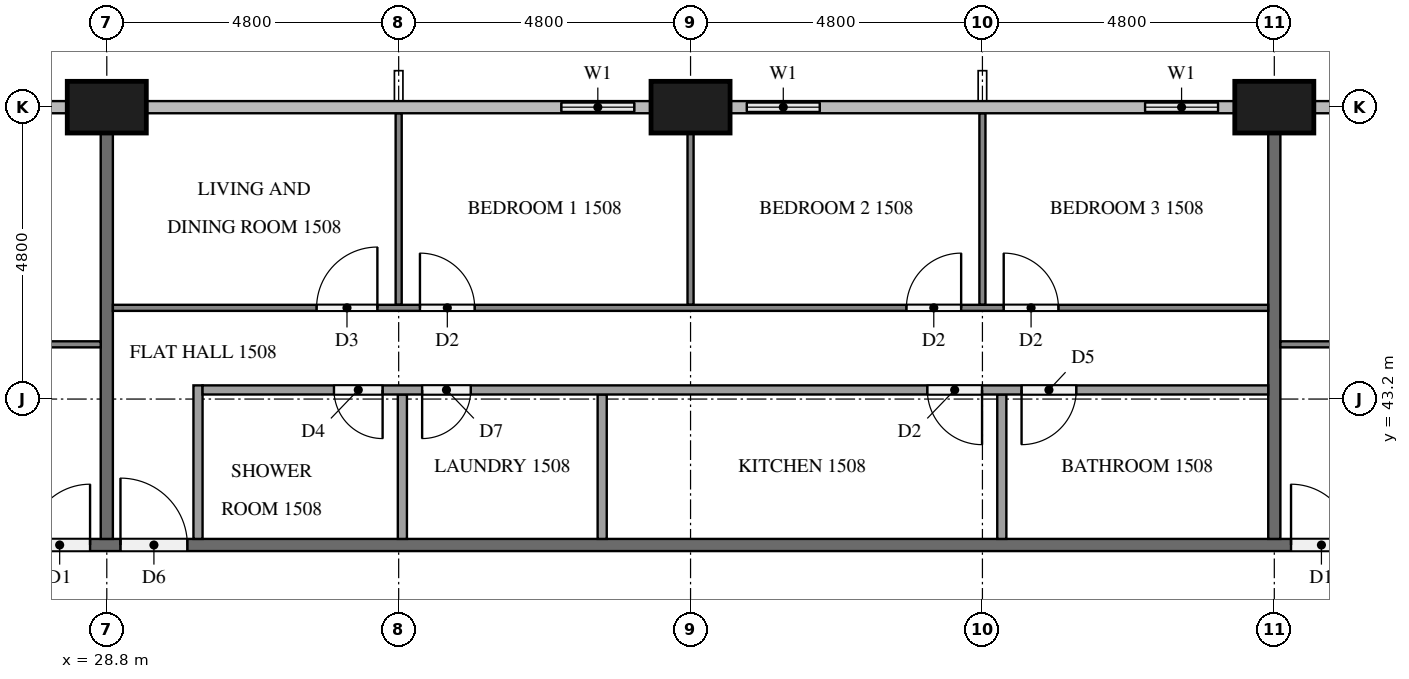
"""IFC4 building model, lengths in metres.
Left out: names, types, materials, properties, quantities, classifications, styles, units other than length and angle.
Written with IfcOpenShell. Run it as: python <this file> out.ifc"""

import sys

from ifc_helpers import new_model, si_unit, direction, frame, frame_2d, origin, origin_2d, place, context, subcontext, project, spatial, rectangle, extrude, element, fill, save


model = new_model("IFC4")
c1 = context("Model", 3, precision=1e-05, world=origin(), true_north=direction((0.0, 1.0)))
c2 = subcontext(c1, "Body", "Model", "MODEL_VIEW")
j1 = project(units=[si_unit("LENGTHUNIT", "METRE"), si_unit("PLANEANGLEUNIT", "RADIAN")], contexts=[c1])
p1 = place(None, origin())
s1 = spatial("IfcSite", under=j1, at=p1, CompositionType="ELEMENT")
p2 = place(p1, origin())
s2 = spatial("IfcBuilding", under=s1, at=p2, CompositionType="ELEMENT")
p3 = place(p2, frame((0.0, 0.0, 62.8)))
s3 = spatial("IfcBuildingStorey", under=s2, at=p3, CompositionType="ELEMENT", Elevation=62.8)
for number, where, z_axis, x_axis in (
    (1, (48.0, 48.0, 0.0), (0.0, 0.0, 1.0), (1.0, 0.0, 0.0)),
    (2, (38.4, 48.0, 0.0), (0.0, 0.0, 1.0), (1.0, 0.0, 0.0)),
    (3, (28.8, 48.0, 0.0), (0.0, 0.0, 1.0), (1.0, 0.0, 0.0)),
):
    element("IfcColumn", number, at=place(p3, frame(where, z_axis=z_axis, x_axis=x_axis)), inside=s3, PredefinedType="COLUMN", context=c2, shape_type="SweptSolid", body=[
        extrude(rectangle(XDim=1.3, YDim=0.85, at=origin_2d()), origin(), (0.0, 0.0, 1.0), 3.2),
    ])
p4 = place(p3, frame((50.4, 48.0, 0.0), z_axis=(0.0, 0.0, 1.0), x_axis=(-1.0, 0.0, 0.0)))
e4 = element("IfcWall", 4, at=p4, inside=s3, PredefinedType="SOLIDWALL", context=c2, shape_type="SweptSolid", body=[
    extrude(rectangle(XDim=1.75, YDim=0.15, at=frame_2d((0.875, 0.0))), origin(), (0.0, 0.0, 1.0), 3.2),
])
p5 = place(p4, frame((0.275, 0.0, 0.9)))
e5 = element("IfcOpeningElement", 5, at=p5, cuts=e4, PredefinedType="OPENING", context=c2, shape_type="SweptSolid", body=[
    extrude(rectangle(XDim=1.2, YDim=1.4, at=frame_2d((0.6, 0.7))), frame((0.0, 0.085, 0.0), z_axis=(0.0, -1.0, 0.0), x_axis=(1.0, 0.0, 0.0)), (0.0, 0.0, 1.0), 0.17),
])
p6 = place(p3, frame((47.35, 48.0, 0.0), z_axis=(0.0, 0.0, 1.0), x_axis=(-1.0, 0.0, 0.0)))
e6 = element("IfcWall", 6, at=p6, inside=s3, PredefinedType="SOLIDWALL", context=c2, shape_type="SweptSolid", body=[
    extrude(rectangle(XDim=1.75, YDim=0.15, at=frame_2d((0.875, 0.0))), origin(), (0.0, 0.0, 1.0), 3.2),
])
p7 = place(p6, frame((0.275, 0.0, 0.9)))
e7 = element("IfcOpeningElement", 7, at=p7, cuts=e6, PredefinedType="OPENING", context=c2, shape_type="SweptSolid", body=[
    extrude(rectangle(XDim=1.2, YDim=1.4, at=frame_2d((0.6, 0.7))), frame((0.0, 0.085, 0.0), z_axis=(0.0, -1.0, 0.0), x_axis=(1.0, 0.0, 0.0)), (0.0, 0.0, 1.0), 0.17),
])
p8 = place(p3, frame((40.8, 48.0, 0.0), z_axis=(0.0, 0.0, 1.0), x_axis=(-1.0, 0.0, 0.0)))
e8 = element("IfcWall", 8, at=p8, inside=s3, PredefinedType="SOLIDWALL", context=c2, shape_type="SweptSolid", body=[
    extrude(rectangle(XDim=1.75, YDim=0.15, at=frame_2d((0.875, 0.0))), origin(), (0.0, 0.0, 1.0), 3.2),
])
p9 = place(p8, frame((0.275, 0.0, 0.9)))
e9 = element("IfcOpeningElement", 9, at=p9, cuts=e8, PredefinedType="OPENING", context=c2, shape_type="SweptSolid", body=[
    extrude(rectangle(XDim=1.2, YDim=1.4, at=frame_2d((0.6, 0.7))), frame((0.0, 0.085, 0.0), z_axis=(0.0, -1.0, 0.0), x_axis=(1.0, 0.0, 0.0)), (0.0, 0.0, 1.0), 0.17),
])
p10 = place(p3, frame((37.75, 48.0, 0.0), z_axis=(0.0, 0.0, 1.0), x_axis=(-1.0, 0.0, 0.0)))
e10 = element("IfcWall", 10, at=p10, inside=s3, PredefinedType="SOLIDWALL", context=c2, shape_type="SweptSolid", body=[
    extrude(rectangle(XDim=1.75, YDim=0.15, at=frame_2d((0.875, 0.0))), origin(), (0.0, 0.0, 1.0), 3.2),
])
p11 = place(p10, frame((0.275, 0.0, 0.9)))
e11 = element("IfcOpeningElement", 11, at=p11, cuts=e10, PredefinedType="OPENING", context=c2, shape_type="SweptSolid", body=[
    extrude(rectangle(XDim=1.2, YDim=1.4, at=frame_2d((0.6, 0.7))), frame((0.0, 0.085, 0.0), z_axis=(0.0, -1.0, 0.0), x_axis=(1.0, 0.0, 0.0)), (0.0, 0.0, 1.0), 0.17),
])
p12 = place(p3, frame((28.15, 48.0, 0.0), z_axis=(0.0, 0.0, 1.0), x_axis=(-1.0, 0.0, 0.0)))
e12 = element("IfcWall", 12, at=p12, inside=s3, PredefinedType="SOLIDWALL", context=c2, shape_type="SweptSolid", body=[
    extrude(rectangle(XDim=1.75, YDim=0.15, at=frame_2d((0.875, 0.0))), origin(), (0.0, 0.0, 1.0), 3.2),
])
p13 = place(p12, frame((0.275, 0.0, 0.9)))
e13 = element("IfcOpeningElement", 13, at=p13, cuts=e12, PredefinedType="OPENING", context=c2, shape_type="SweptSolid", body=[
    extrude(rectangle(XDim=1.2, YDim=1.4, at=frame_2d((0.6, 0.7))), frame((0.0, 0.085, 0.0), z_axis=(0.0, -1.0, 0.0), x_axis=(1.0, 0.0, 0.0)), (0.0, 0.0, 1.0), 0.17),
])
p14 = place(p3, frame((11.9, 40.8, 0.0), z_axis=(0.0, 0.0, 1.0), x_axis=(1.0, 0.0, 0.0)))
e14 = element("IfcWall", 14, at=p14, inside=s3, PredefinedType="PARTITIONING", context=c2, shape_type="SweptSolid", body=[
    extrude(rectangle(XDim=38.6, YDim=0.2, at=frame_2d((19.3, 0.0))), origin(), (0.0, 0.0, 1.0), 3.2),
])
p15 = place(p14, frame((36.375, 0.0, 0.0)))
e15 = element("IfcOpeningElement", 15, at=p15, cuts=e14, PredefinedType="OPENING", context=c2, shape_type="SweptSolid", body=[
    extrude(rectangle(XDim=1.0, YDim=2.1, at=frame_2d((0.5, 1.05))), frame((0.0, 0.11, 0.0), z_axis=(0.0, -1.0, 0.0), x_axis=(1.0, 0.0, 0.0)), (0.0, 0.0, 1.0), 0.22),
])
p16 = place(p14, frame((17.125, 0.0, 0.0)))
e16 = element("IfcOpeningElement", 16, at=p16, cuts=e14, PredefinedType="OPENING", context=c2, shape_type="SweptSolid", body=[
    extrude(rectangle(XDim=1.1, YDim=2.1, at=frame_2d((0.55, 1.05))), frame((0.0, 0.11, 0.0), z_axis=(0.0, -1.0, 0.0), x_axis=(1.0, 0.0, 0.0)), (0.0, 0.0, 1.0), 0.22),
])
p17 = place(p14, frame((15.625, 0.0, 0.0)))
e17 = element("IfcOpeningElement", 17, at=p17, cuts=e14, PredefinedType="OPENING", context=c2, shape_type="SweptSolid", body=[
    extrude(rectangle(XDim=1.0, YDim=2.1, at=frame_2d((0.5, 1.05))), frame((0.0, 0.11, 0.0), z_axis=(0.0, -1.0, 0.0), x_axis=(1.0, 0.0, 0.0)), (0.0, 0.0, 1.0), 0.22),
])
p18 = place(p14, frame((1.225, 0.0, 0.0)))
e18 = element("IfcOpeningElement", 18, at=p18, cuts=e14, PredefinedType="OPENING", context=c2, shape_type="SweptSolid", body=[
    extrude(rectangle(XDim=1.0, YDim=2.1, at=frame_2d((0.5, 1.05))), frame((0.0, 0.11, 0.0), z_axis=(0.0, -1.0, 0.0), x_axis=(1.0, 0.0, 0.0)), (0.0, 0.0, 1.0), 0.22),
])
for number, where, z_axis, x_axis in (
    (19, (48.0, 47.575, 0.0), (0.0, 0.0, 1.0), (0.0, -1.0, 0.0)),
    (20, (28.8, 47.575, 0.0), (0.0, 0.0, 1.0), (0.0, -1.0, 0.0)),
):
    element("IfcWall", number, at=place(p3, frame(where, z_axis=z_axis, x_axis=x_axis)), inside=s3, PredefinedType="PARTITIONING", context=c2, shape_type="SweptSolid", body=[
        extrude(rectangle(XDim=6.675, YDim=0.2, at=frame_2d((3.337, 0.0))), origin(), (0.0, 0.0, 1.0), 3.2),
    ])
p19 = place(p3, frame((48.1, 44.1, 0.0), z_axis=(0.0, 0.0, 1.0), x_axis=(1.0, 0.0, 0.0)))
e21 = element("IfcWall", 21, at=p19, inside=s3, PredefinedType="PARTITIONING", context=c2, shape_type="SweptSolid", body=[
    extrude(rectangle(XDim=13.959, YDim=0.1, at=frame_2d((6.979, 0.0))), origin(), (0.0, 0.0, 1.0), 3.2),
])
p20 = place(p19, frame((3.45, 0.0, 0.0)))
e22 = element("IfcOpeningElement", 22, at=p20, cuts=e21, PredefinedType="OPENING", context=c2, shape_type="SweptSolid", body=[
    extrude(rectangle(XDim=0.9, YDim=2.1, at=frame_2d((0.45, 1.05))), frame((0.0, 0.06, 0.0), z_axis=(0.0, -1.0, 0.0), x_axis=(1.0, 0.0, 0.0)), (0.0, 0.0, 1.0), 0.12),
])
p21 = place(p19, frame((5.05, 0.0, 0.0)))
e23 = element("IfcOpeningElement", 23, at=p21, cuts=e21, PredefinedType="OPENING", context=c2, shape_type="SweptSolid", body=[
    extrude(rectangle(XDim=1.0, YDim=2.1, at=frame_2d((0.5, 1.05))), frame((0.0, 0.06, 0.0), z_axis=(0.0, -1.0, 0.0), x_axis=(1.0, 0.0, 0.0)), (0.0, 0.0, 1.0), 0.12),
])
p22 = place(p19, frame((12.759, 0.0, 0.0)))
e24 = element("IfcOpeningElement", 24, at=p22, cuts=e21, PredefinedType="OPENING", context=c2, shape_type="SweptSolid", body=[
    extrude(rectangle(XDim=0.9, YDim=2.1, at=frame_2d((0.45, 1.05))), frame((0.0, 0.06, 0.0), z_axis=(0.0, -1.0, 0.0), x_axis=(1.0, 0.0, 0.0)), (0.0, 0.0, 1.0), 0.12),
])
p23 = place(p3, frame((33.6, 44.75, 0.0), z_axis=(0.0, 0.0, 1.0), x_axis=(0.0, 1.0, 0.0)))
e25 = element("IfcWall", 25, at=p23, inside=s3, PredefinedType="PARTITIONING", context=c2, shape_type="SweptSolid", body=[
    extrude(rectangle(XDim=3.15, YDim=0.1, at=frame_2d((1.575, 0.0))), origin(), (0.0, 0.0, 1.0), 3.2),
])
p24 = place(p3, frame((38.4, 44.75, 0.0), z_axis=(0.0, 0.0, 1.0), x_axis=(0.0, 1.0, 0.0)))
e26 = element("IfcWall", 26, at=p24, inside=s3, PredefinedType="PARTITIONING", context=c2, shape_type="SweptSolid", body=[
    extrude(rectangle(XDim=2.825, YDim=0.1, at=frame_2d((1.413, 0.0))), origin(), (0.0, 0.0, 1.0), 3.2),
])
p25 = place(p3, frame((43.2, 44.75, 0.0), z_axis=(0.0, 0.0, 1.0), x_axis=(0.0, 1.0, 0.0)))
e27 = element("IfcWall", 27, at=p25, inside=s3, PredefinedType="PARTITIONING", context=c2, shape_type="SweptSolid", body=[
    extrude(rectangle(XDim=3.15, YDim=0.1, at=frame_2d((1.575, 0.0))), origin(), (0.0, 0.0, 1.0), 3.2),
])
p26 = place(p3, frame((28.9, 44.7, 0.0), z_axis=(0.0, 0.0, 1.0), x_axis=(1.0, 0.0, 0.0)))
e28 = element("IfcWall", 28, at=p26, inside=s3, PredefinedType="PARTITIONING", context=c2, shape_type="SweptSolid", body=[
    extrude(rectangle(XDim=19.0, YDim=0.1, at=frame_2d((9.5, 0.0))), origin(), (0.0, 0.0, 1.0), 3.2),
])
p27 = place(p26, frame((3.35, 0.0, 0.0)))
e29 = element("IfcOpeningElement", 29, at=p27, cuts=e28, PredefinedType="OPENING", context=c2, shape_type="SweptSolid", body=[
    extrude(rectangle(XDim=1.0, YDim=2.1, at=frame_2d((0.5, 1.05))), frame((0.0, 0.06, 0.0), z_axis=(0.0, -1.0, 0.0), x_axis=(1.0, 0.0, 0.0)), (0.0, 0.0, 1.0), 0.12),
])
p28 = place(p26, frame((5.05, 0.0, 0.0)))
e30 = element("IfcOpeningElement", 30, at=p28, cuts=e28, PredefinedType="OPENING", context=c2, shape_type="SweptSolid", body=[
    extrude(rectangle(XDim=0.9, YDim=2.1, at=frame_2d((0.45, 1.05))), frame((0.0, 0.06, 0.0), z_axis=(0.0, -1.0, 0.0), x_axis=(1.0, 0.0, 0.0)), (0.0, 0.0, 1.0), 0.12),
])
p29 = place(p26, frame((13.05, 0.0, 0.0)))
e31 = element("IfcOpeningElement", 31, at=p29, cuts=e28, PredefinedType="OPENING", context=c2, shape_type="SweptSolid", body=[
    extrude(rectangle(XDim=0.9, YDim=2.1, at=frame_2d((0.45, 1.05))), frame((0.0, 0.06, 0.0), z_axis=(0.0, -1.0, 0.0), x_axis=(1.0, 0.0, 0.0)), (0.0, 0.0, 1.0), 0.12),
])
p30 = place(p26, frame((14.65, 0.0, 0.0)))
e32 = element("IfcOpeningElement", 32, at=p30, cuts=e28, PredefinedType="OPENING", context=c2, shape_type="SweptSolid", body=[
    extrude(rectangle(XDim=0.9, YDim=2.1, at=frame_2d((0.45, 1.05))), frame((0.0, 0.06, 0.0), z_axis=(0.0, -1.0, 0.0), x_axis=(1.0, 0.0, 0.0)), (0.0, 0.0, 1.0), 0.12),
])
for number, where, z_axis, x_axis in (
    (33, (33.661, 40.9, 0.0), (0.0, 0.0, 1.0), (0.0, 1.0, 0.0)),
    (34, (36.947, 40.9, 0.0), (0.0, 0.0, 1.0), (0.0, 1.0, 0.0)),
    (35, (43.519, 40.9, 0.0), (0.0, 0.0, 1.0), (0.0, 1.0, 0.0)),
):
    element("IfcWall", number, at=place(p3, frame(where, z_axis=z_axis, x_axis=x_axis)), inside=s3, PredefinedType="PARTITIONING", context=c2, shape_type="SweptSolid", body=[
        extrude(rectangle(XDim=2.375, YDim=0.15, at=frame_2d((1.188, 0.0))), origin(), (0.0, 0.0, 1.0), 3.2),
    ])
p31 = place(p3, frame((30.3, 40.9, 0.0), z_axis=(0.0, 0.0, 1.0), x_axis=(0.0, 1.0, 0.0)))
e36 = element("IfcWall", 36, at=p31, inside=s3, PredefinedType="PARTITIONING", context=c2, shape_type="SweptSolid", body=[
    extrude(rectangle(XDim=2.525, YDim=0.15, at=frame_2d((1.263, 0.0))), origin(), (0.0, 0.0, 1.0), 3.2),
])
p32 = place(p3, frame((47.9, 43.35, 0.0), z_axis=(0.0, 0.0, 1.0), x_axis=(-1.0, 0.0, 0.0)))
e37 = element("IfcWall", 37, at=p32, inside=s3, PredefinedType="PARTITIONING", context=c2, shape_type="SweptSolid", body=[
    extrude(rectangle(XDim=17.525, YDim=0.15, at=frame_2d((8.762, 0.0))), origin(), (0.0, 0.0, 1.0), 3.2),
])
p33 = place(p32, frame((14.564, 0.0, 0.0)))
e38 = element("IfcOpeningElement", 38, at=p33, cuts=e37, PredefinedType="OPENING", context=c2, shape_type="SweptSolid", body=[
    extrude(rectangle(XDim=0.8, YDim=2.1, at=frame_2d((0.4, 1.05))), frame((0.0, 0.085, 0.0), z_axis=(0.0, -1.0, 0.0), x_axis=(1.0, 0.0, 0.0)), (0.0, 0.0, 1.0), 0.17),
])
p34 = place(p32, frame((13.114, 0.0, 0.0)))
e39 = element("IfcOpeningElement", 39, at=p34, cuts=e37, PredefinedType="OPENING", context=c2, shape_type="SweptSolid", body=[
    extrude(rectangle(XDim=0.8, YDim=2.1, at=frame_2d((0.4, 1.05))), frame((0.0, 0.085, 0.0), z_axis=(0.0, -1.0, 0.0), x_axis=(1.0, 0.0, 0.0)), (0.0, 0.0, 1.0), 0.17),
])
p35 = place(p32, frame((4.706, 0.0, 0.0)))
e40 = element("IfcOpeningElement", 40, at=p35, cuts=e37, PredefinedType="OPENING", context=c2, shape_type="SweptSolid", body=[
    extrude(rectangle(XDim=0.9, YDim=2.1, at=frame_2d((0.45, 1.05))), frame((0.0, 0.085, 0.0), z_axis=(0.0, -1.0, 0.0), x_axis=(1.0, 0.0, 0.0)), (0.0, 0.0, 1.0), 0.17),
])
p36 = place(p32, frame((3.156, 0.0, 0.0)))
e41 = element("IfcOpeningElement", 41, at=p36, cuts=e37, PredefinedType="OPENING", context=c2, shape_type="SweptSolid", body=[
    extrude(rectangle(XDim=0.9, YDim=2.1, at=frame_2d((0.45, 1.05))), frame((0.0, 0.085, 0.0), z_axis=(0.0, -1.0, 0.0), x_axis=(1.0, 0.0, 0.0)), (0.0, 0.0, 1.0), 0.17),
])
p37 = place(p3, frame((14.5, 44.1, 0.0), z_axis=(0.0, 0.0, 1.0), x_axis=(1.0, 0.0, 0.0)))
e42 = element("IfcWall", 42, at=p37, inside=s3, PredefinedType="PARTITIONING", context=c2, shape_type="SweptSolid", body=[
    extrude(rectangle(XDim=14.2, YDim=0.1, at=frame_2d((7.1, 0.0))), origin(), (0.0, 0.0, 1.0), 3.2),
])
p38 = place(p37, frame((9.85, 0.0, 0.0)))
e43 = element("IfcOpeningElement", 43, at=p38, cuts=e42, PredefinedType="OPENING", context=c2, shape_type="SweptSolid", body=[
    extrude(rectangle(XDim=0.9, YDim=2.1, at=frame_2d((0.45, 1.05))), frame((0.0, 0.06, 0.0), z_axis=(0.0, -1.0, 0.0), x_axis=(1.0, 0.0, 0.0)), (0.0, 0.0, 1.0), 0.12),
])
p39 = place(p37, frame((8.25, 0.0, 0.0)))
e44 = element("IfcOpeningElement", 44, at=p39, cuts=e42, PredefinedType="OPENING", context=c2, shape_type="SweptSolid", body=[
    extrude(rectangle(XDim=0.9, YDim=2.1, at=frame_2d((0.45, 1.05))), frame((0.0, 0.06, 0.0), z_axis=(0.0, -1.0, 0.0), x_axis=(1.0, 0.0, 0.0)), (0.0, 0.0, 1.0), 0.12),
])
p40 = place(p37, frame((0.3, 0.0, 0.0)))
e45 = element("IfcOpeningElement", 45, at=p40, cuts=e42, PredefinedType="OPENING", context=c2, shape_type="SweptSolid", body=[
    extrude(rectangle(XDim=1.0, YDim=2.1, at=frame_2d((0.5, 1.05))), frame((0.0, 0.06, 0.0), z_axis=(0.0, -1.0, 0.0), x_axis=(1.0, 0.0, 0.0)), (0.0, 0.0, 1.0), 0.12),
])
p41 = place(p7, origin())
e46 = element("IfcWindow", 46, at=p41, inside=s3, PartitioningType="SINGLE_PANEL", PredefinedType="WINDOW", context=c2, shape_type="SweptSolid", body=[
    extrude(rectangle(XDim=1.2, YDim=1.4, at=frame_2d((0.6, 0.7))), frame((0.0, 0.03, 0.0), z_axis=(0.0, -1.0, 0.0), x_axis=(1.0, 0.0, 0.0)), (0.0, 0.0, 1.0), 0.06),
])
fill(e7, e46)
p42 = place(p9, origin())
e47 = element("IfcWindow", 47, at=p42, inside=s3, PartitioningType="SINGLE_PANEL", PredefinedType="WINDOW", context=c2, shape_type="SweptSolid", body=[
    extrude(rectangle(XDim=1.2, YDim=1.4, at=frame_2d((0.6, 0.7))), frame((0.0, 0.03, 0.0), z_axis=(0.0, -1.0, 0.0), x_axis=(1.0, 0.0, 0.0)), (0.0, 0.0, 1.0), 0.06),
])
fill(e9, e47)
p43 = place(p11, origin())
e48 = element("IfcWindow", 48, at=p43, inside=s3, PartitioningType="SINGLE_PANEL", PredefinedType="WINDOW", context=c2, shape_type="SweptSolid", body=[
    extrude(rectangle(XDim=1.2, YDim=1.4, at=frame_2d((0.6, 0.7))), frame((0.0, 0.03, 0.0), z_axis=(0.0, -1.0, 0.0), x_axis=(1.0, 0.0, 0.0)), (0.0, 0.0, 1.0), 0.06),
])
fill(e11, e48)
p44 = place(p15, origin())
e49 = element("IfcDoor", 49, at=p44, inside=s3, OperationType="SINGLE_SWING_LEFT", PredefinedType="DOOR", context=c2, shape_type="SweptSolid", body=[
    extrude(rectangle(XDim=1.0, YDim=2.1, at=frame_2d((0.5, 1.05))), frame((0.0, 0.025, 0.0), z_axis=(0.0, -1.0, 0.0), x_axis=(1.0, 0.0, 0.0)), (0.0, 0.0, 1.0), 0.05),
])
fill(e15, e49)
p45 = place(p16, origin())
e50 = element("IfcDoor", 50, at=p45, inside=s3, OperationType="SINGLE_SWING_LEFT", PredefinedType="DOOR", context=c2, shape_type="SweptSolid", body=[
    extrude(rectangle(XDim=1.1, YDim=2.1, at=frame_2d((0.55, 1.05))), frame((0.0, 0.025, 0.0), z_axis=(0.0, -1.0, 0.0), x_axis=(1.0, 0.0, 0.0)), (0.0, 0.0, 1.0), 0.05),
])
fill(e16, e50)
p46 = place(p17, origin())
e51 = element("IfcDoor", 51, at=p46, inside=s3, OperationType="SINGLE_SWING_RIGHT", PredefinedType="DOOR", context=c2, shape_type="SweptSolid", body=[
    extrude(rectangle(XDim=1.0, YDim=2.1, at=frame_2d((0.5, 1.05))), frame((0.0, 0.025, 0.0), z_axis=(0.0, -1.0, 0.0), x_axis=(1.0, 0.0, 0.0)), (0.0, 0.0, 1.0), 0.05),
])
fill(e17, e51)
p47 = place(p27, origin())
e52 = element("IfcDoor", 52, at=p47, inside=s3, OperationType="SINGLE_SWING_RIGHT", PredefinedType="DOOR", context=c2, shape_type="SweptSolid", body=[
    extrude(rectangle(XDim=1.0, YDim=2.1, at=frame_2d((0.5, 1.05))), frame((0.0, 0.025, 0.0), z_axis=(0.0, -1.0, 0.0), x_axis=(1.0, 0.0, 0.0)), (0.0, 0.0, 1.0), 0.05),
])
fill(e29, e52)
p48 = place(p28, origin())
e53 = element("IfcDoor", 53, at=p48, inside=s3, OperationType="SINGLE_SWING_LEFT", PredefinedType="DOOR", context=c2, shape_type="SweptSolid", body=[
    extrude(rectangle(XDim=0.9, YDim=2.1, at=frame_2d((0.45, 1.05))), frame((0.0, 0.025, 0.0), z_axis=(0.0, -1.0, 0.0), x_axis=(1.0, 0.0, 0.0)), (0.0, 0.0, 1.0), 0.05),
])
fill(e30, e53)
p49 = place(p29, origin())
e54 = element("IfcDoor", 54, at=p49, inside=s3, OperationType="SINGLE_SWING_RIGHT", PredefinedType="DOOR", context=c2, shape_type="SweptSolid", body=[
    extrude(rectangle(XDim=0.9, YDim=2.1, at=frame_2d((0.45, 1.05))), frame((0.0, 0.025, 0.0), z_axis=(0.0, -1.0, 0.0), x_axis=(1.0, 0.0, 0.0)), (0.0, 0.0, 1.0), 0.05),
])
fill(e31, e54)
p50 = place(p30, origin())
e55 = element("IfcDoor", 55, at=p50, inside=s3, OperationType="SINGLE_SWING_LEFT", PredefinedType="DOOR", context=c2, shape_type="SweptSolid", body=[
    extrude(rectangle(XDim=0.9, YDim=2.1, at=frame_2d((0.45, 1.05))), frame((0.0, 0.025, 0.0), z_axis=(0.0, -1.0, 0.0), x_axis=(1.0, 0.0, 0.0)), (0.0, 0.0, 1.0), 0.05),
])
fill(e32, e55)
p51 = place(p33, origin())
e56 = element("IfcDoor", 56, at=p51, inside=s3, OperationType="SINGLE_SWING_LEFT", PredefinedType="DOOR", context=c2, shape_type="SweptSolid", body=[
    extrude(rectangle(XDim=0.8, YDim=2.1, at=frame_2d((0.4, 1.05))), frame((0.0, 0.025, 0.0), z_axis=(0.0, -1.0, 0.0), x_axis=(1.0, 0.0, 0.0)), (0.0, 0.0, 1.0), 0.05),
])
fill(e38, e56)
p52 = place(p34, origin())
e57 = element("IfcDoor", 57, at=p52, inside=s3, OperationType="SINGLE_SWING_RIGHT", PredefinedType="DOOR", context=c2, shape_type="SweptSolid", body=[
    extrude(rectangle(XDim=0.8, YDim=2.1, at=frame_2d((0.4, 1.05))), frame((0.0, 0.025, 0.0), z_axis=(0.0, -1.0, 0.0), x_axis=(1.0, 0.0, 0.0)), (0.0, 0.0, 1.0), 0.05),
])
fill(e39, e57)
p53 = place(p35, origin())
e58 = element("IfcDoor", 58, at=p53, inside=s3, OperationType="SINGLE_SWING_LEFT", PredefinedType="DOOR", context=c2, shape_type="SweptSolid", body=[
    extrude(rectangle(XDim=0.9, YDim=2.1, at=frame_2d((0.45, 1.05))), frame((0.0, 0.025, 0.0), z_axis=(0.0, -1.0, 0.0), x_axis=(1.0, 0.0, 0.0)), (0.0, 0.0, 1.0), 0.05),
])
fill(e40, e58)
p54 = place(p36, origin())
e59 = element("IfcDoor", 59, at=p54, inside=s3, OperationType="SINGLE_SWING_RIGHT", PredefinedType="DOOR", context=c2, shape_type="SweptSolid", body=[
    extrude(rectangle(XDim=0.9, YDim=2.1, at=frame_2d((0.45, 1.05))), frame((0.0, 0.025, 0.0), z_axis=(0.0, -1.0, 0.0), x_axis=(1.0, 0.0, 0.0)), (0.0, 0.0, 1.0), 0.05),
])
fill(e41, e59)
save(model, sys.argv[1])
